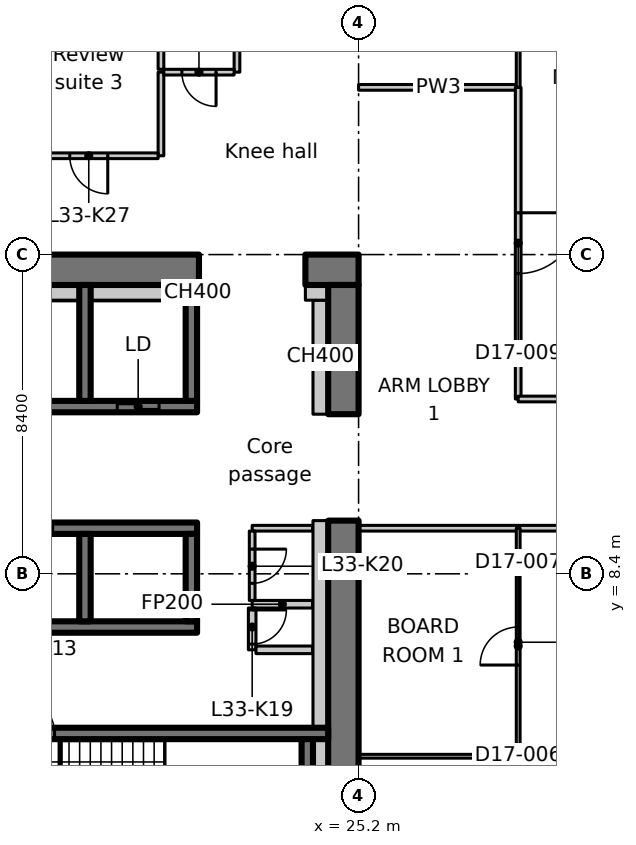
"""IFC4 building model, lengths in metres.
Left out: names, types, materials, properties, quantities, classifications, styles, units other than length and angle.
Written with IfcOpenShell. Run it as: python <this file> out.ifc"""

import sys

from ifc_helpers import new_model, si_unit, direction, frame, frame_2d, origin, place, context, subcontext, project, spatial, polyline, rectangle, outline, extrude, element, fill, save


model = new_model("IFC4")
c1 = context("Model", 3, precision=1e-05, world=origin(), true_north=direction((0.0, 1.0)))
c2 = subcontext(c1, "Body", "Model", "MODEL_VIEW")
j1 = project(units=[si_unit("LENGTHUNIT", "METRE"), si_unit("PLANEANGLEUNIT", "RADIAN")], contexts=[c1])
p1 = place(None, origin())
s1 = spatial("IfcSite", under=j1, at=p1, CompositionType="ELEMENT")
p2 = place(p1, origin())
s2 = spatial("IfcBuilding", under=s1, at=p2, CompositionType="ELEMENT")
p3 = place(p2, frame((0.0, 0.0, 134.9)))
s3 = spatial("IfcBuildingStorey", under=s2, at=p3, CompositionType="ELEMENT", Elevation=134.9)
p4 = place(p3, frame((-1.1, 16.4, 0.0), z_axis=(0.0, 0.0, 1.0), x_axis=(1.0, 0.0, 0.0)))
e1 = element("IfcWall", 1, at=p4, inside=s3, PredefinedType="SHEAR", context=c2, shape_type="SweptSolid", body=[
    extrude(rectangle(XDim=22.1, YDim=0.8, at=frame_2d((11.05, 0.0))), origin(), (0.0, 0.0, 1.0), 3.35),
])
p5 = place(p4, frame((3.15, 0.0, 0.0)))
e2 = element("IfcOpeningElement", 2, at=p5, cuts=e1, PredefinedType="OPENING", context=c2, shape_type="SweptSolid", body=[
    extrude(rectangle(XDim=1.1, YDim=2.3, at=frame_2d((0.55, 1.15))), frame((0.0, 0.41, 0.0), z_axis=(0.0, -1.0, 0.0), x_axis=(1.0, 0.0, 0.0)), (0.0, 0.0, 1.0), 0.82),
])
p6 = place(p3, frame((23.8, 16.4, 0.0), z_axis=(0.0, 0.0, 1.0), x_axis=(1.0, 0.0, 0.0)))
e3 = element("IfcWall", 3, at=p6, inside=s3, PredefinedType="SHEAR", context=c2, shape_type="SweptSolid", body=[
    extrude(rectangle(XDim=1.4, YDim=0.8, at=frame_2d((0.7, 0.0))), origin(), (0.0, 0.0, 1.0), 3.35),
])
p7 = place(p3, frame((24.8, 0.8, 0.0), z_axis=(0.0, 0.0, 1.0), x_axis=(0.0, 1.0, 0.0)))
e4 = element("IfcWall", 4, at=p7, inside=s3, PredefinedType="SHEAR", context=c2, shape_type="SweptSolid", body=[
    extrude(rectangle(XDim=9.0, YDim=0.8, at=frame_2d((4.5, 0.0))), origin(), (0.0, 0.0, 1.0), 3.35),
])
p8 = place(p3, frame((24.8, 12.6, 0.0), z_axis=(0.0, 0.0, 1.0), x_axis=(0.0, 1.0, 0.0)))
e5 = element("IfcWall", 5, at=p8, inside=s3, PredefinedType="SHEAR", context=c2, shape_type="SweptSolid", body=[
    extrude(rectangle(XDim=3.4, YDim=0.8, at=frame_2d((1.7, 0.0))), origin(), (0.0, 0.0, 1.0), 3.35),
])
p9 = place(p3, frame((24.2, 12.6, 0.0), z_axis=(0.0, 0.0, 1.0), x_axis=(0.0, 1.0, 0.0)))
e6 = element("IfcWall", 6, at=p9, inside=s3, PredefinedType="PARTITIONING", context=c2, shape_type="SweptSolid", body=[
    extrude(rectangle(XDim=3.0, YDim=0.4, at=frame_2d((1.5, 0.0))), origin(), (0.0, 0.0, 1.0), 3.35),
])
p10 = place(p3, frame((23.8, 15.8, 0.0), z_axis=(0.0, 0.0, 1.0), x_axis=(1.0, 0.0, 0.0)))
e7 = element("IfcWall", 7, at=p10, inside=s3, PredefinedType="PARTITIONING", context=c2, shape_type="SweptSolid", body=[
    extrude(rectangle(XDim=0.6, YDim=0.4, at=frame_2d((0.3, 0.0))), origin(), (0.0, 0.0, 1.0), 3.35),
])
p11 = place(p3, frame((0.8, 7.0, 0.0), z_axis=(0.0, 0.0, 1.0), x_axis=(1.0, 0.0, 0.0)))
e8 = element("IfcWall", 8, at=p11, inside=s3, PredefinedType="SHEAR", context=c2, shape_type="SweptSolid", body=[
    extrude(rectangle(XDim=20.15, YDim=0.3, at=frame_2d((10.075, 0.0))), origin(), (0.0, 0.0, 1.0), 3.35),
])
p12 = place(p3, frame((0.8, 9.6, 0.0), z_axis=(0.0, 0.0, 1.0), x_axis=(1.0, 0.0, 0.0)))
e9 = element("IfcWall", 9, at=p12, inside=s3, PredefinedType="SHEAR", context=c2, shape_type="SweptSolid", body=[
    extrude(rectangle(XDim=20.15, YDim=0.3, at=frame_2d((10.075, 0.0))), origin(), (0.0, 0.0, 1.0), 3.35),
])
p13 = place(p12, frame((1.25, 0.0, 0.0)))
e10 = element("IfcOpeningElement", 10, at=p13, cuts=e9, PredefinedType="OPENING", context=c2, shape_type="SweptSolid", body=[
    extrude(rectangle(XDim=1.1, YDim=2.3, at=frame_2d((0.55, 1.15))), frame((0.0, 0.16, 0.0), z_axis=(0.0, -1.0, 0.0), x_axis=(1.0, 0.0, 0.0)), (0.0, 0.0, 1.0), 0.32),
])
p14 = place(p12, frame((4.05, 0.0, 0.0)))
e11 = element("IfcOpeningElement", 11, at=p14, cuts=e9, PredefinedType="OPENING", context=c2, shape_type="SweptSolid", body=[
    extrude(rectangle(XDim=1.1, YDim=2.3, at=frame_2d((0.55, 1.15))), frame((0.0, 0.16, 0.0), z_axis=(0.0, -1.0, 0.0), x_axis=(1.0, 0.0, 0.0)), (0.0, 0.0, 1.0), 0.32),
])
p15 = place(p12, frame((6.85, 0.0, 0.0)))
e12 = element("IfcOpeningElement", 12, at=p15, cuts=e9, PredefinedType="OPENING", context=c2, shape_type="SweptSolid", body=[
    extrude(rectangle(XDim=1.1, YDim=2.3, at=frame_2d((0.55, 1.15))), frame((0.0, 0.16, 0.0), z_axis=(0.0, -1.0, 0.0), x_axis=(1.0, 0.0, 0.0)), (0.0, 0.0, 1.0), 0.32),
])
p16 = place(p12, frame((9.65, 0.0, 0.0)))
e13 = element("IfcOpeningElement", 13, at=p16, cuts=e9, PredefinedType="OPENING", context=c2, shape_type="SweptSolid", body=[
    extrude(rectangle(XDim=1.1, YDim=2.3, at=frame_2d((0.55, 1.15))), frame((0.0, 0.16, 0.0), z_axis=(0.0, -1.0, 0.0), x_axis=(1.0, 0.0, 0.0)), (0.0, 0.0, 1.0), 0.32),
])
p17 = place(p12, frame((12.45, 0.0, 0.0)))
e14 = element("IfcOpeningElement", 14, at=p17, cuts=e9, PredefinedType="OPENING", context=c2, shape_type="SweptSolid", body=[
    extrude(rectangle(XDim=1.1, YDim=2.3, at=frame_2d((0.55, 1.15))), frame((0.0, 0.16, 0.0), z_axis=(0.0, -1.0, 0.0), x_axis=(1.0, 0.0, 0.0)), (0.0, 0.0, 1.0), 0.32),
])
p18 = place(p12, frame((15.25, 0.0, 0.0)))
e15 = element("IfcOpeningElement", 15, at=p18, cuts=e9, PredefinedType="OPENING", context=c2, shape_type="SweptSolid", body=[
    extrude(rectangle(XDim=1.1, YDim=2.3, at=frame_2d((0.55, 1.15))), frame((0.0, 0.16, 0.0), z_axis=(0.0, -1.0, 0.0), x_axis=(1.0, 0.0, 0.0)), (0.0, 0.0, 1.0), 0.32),
])
for number, where, z_axis, x_axis in (
    (16, (18.0, 7.15, 0.0), (0.0, 0.0, 1.0), (0.0, 1.0, 0.0)),
    (17, (20.8, 7.15, 0.0), (0.0, 0.0, 1.0), (0.0, 1.0, 0.0)),
):
    element("IfcWall", number, at=place(p3, frame(where, z_axis=z_axis, x_axis=x_axis)), inside=s3, PredefinedType="SHEAR", context=c2, shape_type="SweptSolid", body=[
        extrude(rectangle(XDim=2.3, YDim=0.3, at=frame_2d((1.15, 0.0))), origin(), (0.0, 0.0, 1.0), 3.35),
    ])
p19 = place(p3, frame((15.05, 12.8, 0.0), z_axis=(0.0, 0.0, 1.0), x_axis=(1.0, 0.0, 0.0)))
e18 = element("IfcWall", 18, at=p19, inside=s3, PredefinedType="SHEAR", context=c2, shape_type="SweptSolid", body=[
    extrude(rectangle(XDim=5.9, YDim=0.3, at=frame_2d((2.95, 0.0))), origin(), (0.0, 0.0, 1.0), 3.35),
])
p20 = place(p19, frame((3.8, 0.0, 0.0)))
e19 = element("IfcOpeningElement", 19, at=p20, cuts=e18, PredefinedType="OPENING", context=c2, shape_type="SweptSolid", body=[
    extrude(rectangle(XDim=1.1, YDim=2.3, at=frame_2d((0.55, 1.15))), frame((0.0, 0.16, 0.0), z_axis=(0.0, -1.0, 0.0), x_axis=(1.0, 0.0, 0.0)), (0.0, 0.0, 1.0), 0.32),
])
for number, where, z_axis, x_axis in (
    (20, (18.0, 12.95, 0.0), (0.0, 0.0, 1.0), (0.0, 1.0, 0.0)),
    (21, (20.8, 12.95, 0.0), (0.0, 0.0, 1.0), (0.0, 1.0, 0.0)),
):
    element("IfcWall", number, at=place(p3, frame(where, z_axis=z_axis, x_axis=x_axis)), inside=s3, PredefinedType="SHEAR", context=c2, shape_type="SweptSolid", body=[
        extrude(rectangle(XDim=3.05, YDim=0.3, at=frame_2d((1.525, 0.0))), origin(), (0.0, 0.0, 1.0), 3.35),
    ])
p21 = place(p3, frame((15.8, 4.2, 0.0), z_axis=(0.0, 0.0, 1.0), x_axis=(1.0, 0.0, 0.0)))
e22 = element("IfcWall", 22, at=p21, inside=s3, PredefinedType="SHEAR", context=c2, shape_type="SweptSolid", body=[
    extrude(rectangle(XDim=8.6, YDim=0.3, at=frame_2d((4.3, 0.0))), origin(), (0.0, 0.0, 1.0), 3.35),
])
p22 = place(p21, frame((0.4, 0.0, 0.0)))
e23 = element("IfcOpeningElement", 23, at=p22, cuts=e22, PredefinedType="OPENING", context=c2, shape_type="SweptSolid", body=[
    extrude(rectangle(XDim=1.0, YDim=2.1, at=frame_2d((0.5, 1.05))), frame((0.0, 0.16, 0.0), z_axis=(0.0, -1.0, 0.0), x_axis=(1.0, 0.0, 0.0)), (0.0, 0.0, 1.0), 0.32),
])
p23 = place(p3, frame((23.85, 1.5, 0.0), z_axis=(0.0, 0.0, 1.0), x_axis=(0.0, 1.0, 0.0)))
e24 = element("IfcWall", 24, at=p23, inside=s3, PredefinedType="SHEAR", context=c2, shape_type="SweptSolid", body=[
    extrude(rectangle(XDim=2.55, YDim=0.3, at=frame_2d((1.275, 0.0))), origin(), (0.0, 0.0, 1.0), 3.35),
])
p24 = place(p3, frame((23.988, 7.6, 0.0), z_axis=(0.0, 0.0, 1.0), x_axis=(-1.0, 0.0, 0.0)))
e25 = element("IfcWall", 25, at=p24, inside=s3, PredefinedType="PARTITIONING", context=c2, shape_type="SweptSolid", body=[
    extrude(rectangle(XDim=1.588, YDim=0.2, at=frame_2d((0.794, 0.0))), origin(), (0.0, 0.0, 1.0), 3.35),
])
p25 = place(p3, frame((22.4, 7.5, 0.0), z_axis=(0.0, 0.0, 1.0), x_axis=(0.0, -1.0, 0.0)))
e26 = element("IfcWall", 26, at=p25, inside=s3, PredefinedType="PARTITIONING", context=c2, shape_type="SweptSolid", body=[
    extrude(rectangle(XDim=1.1, YDim=0.2, at=frame_2d((0.55, 0.0))), origin(), (0.0, 0.0, 1.0), 3.35),
])
p26 = place(p25, frame((0.05, 0.0, 0.0)))
e27 = element("IfcOpeningElement", 27, at=p26, cuts=e26, PredefinedType="OPENING", context=c2, shape_type="SweptSolid", body=[
    extrude(rectangle(XDim=0.9, YDim=2.1, at=frame_2d((0.45, 1.05))), frame((0.0, 0.11, 0.0), z_axis=(0.0, -1.0, 0.0), x_axis=(1.0, 0.0, 0.0)), (0.0, 0.0, 1.0), 0.22),
])
p27 = place(p3, frame((22.5, 6.4, 0.0), z_axis=(0.0, 0.0, 1.0), x_axis=(1.0, 0.0, 0.0)))
e28 = element("IfcWall", 28, at=p27, inside=s3, PredefinedType="PARTITIONING", context=c2, shape_type="SweptSolid", body=[
    extrude(rectangle(XDim=1.488, YDim=0.2, at=frame_2d((0.744, 0.0))), origin(), (0.0, 0.0, 1.0), 3.35),
])
p28 = place(p3, frame((20.0, 21.6, 0.0), z_axis=(0.0, 0.0, 1.0), x_axis=(0.0, -1.0, 0.0)))
e29 = element("IfcWall", 29, at=p28, inside=s3, PredefinedType="PARTITIONING", context=c2, shape_type="SweptSolid", body=[
    extrude(rectangle(XDim=2.2, YDim=0.15, at=frame_2d((1.1, 0.0))), origin(), (0.0, 0.0, 1.0), 3.35),
])
p29 = place(p3, frame((19.925, 19.4, 0.0), z_axis=(0.0, 0.0, 1.0), x_axis=(-1.0, 0.0, 0.0)))
e30 = element("IfcWall", 30, at=p29, inside=s3, PredefinedType="PARTITIONING", context=c2, shape_type="SweptSolid", body=[
    extrude(rectangle(XDim=3.725, YDim=0.15, at=frame_2d((1.863, 0.0))), origin(), (0.0, 0.0, 1.0), 3.35),
])
p30 = place(p29, frame((1.325, 0.0, 0.0)))
e31 = element("IfcOpeningElement", 31, at=p30, cuts=e30, PredefinedType="OPENING", context=c2, shape_type="SweptSolid", body=[
    extrude(rectangle(XDim=1.0, YDim=2.1, at=frame_2d((0.5, 1.05))), frame((0.0, 0.085, 0.0), z_axis=(0.0, -1.0, 0.0), x_axis=(1.0, 0.0, 0.0)), (0.0, 0.0, 1.0), 0.17),
])
p31 = place(p3, frame((22.0, 23.925, 0.0), z_axis=(0.0, 0.0, 1.0), x_axis=(0.0, -1.0, 0.0)))
e32 = element("IfcWall", 32, at=p31, inside=s3, PredefinedType="PARTITIONING", context=c2, shape_type="SweptSolid", body=[
    extrude(rectangle(XDim=2.325, YDim=0.15, at=frame_2d((1.163, 0.0))), origin(), (0.0, 0.0, 1.0), 3.35),
])
p32 = place(p3, frame((21.925, 21.6, 0.0), z_axis=(0.0, 0.0, 1.0), x_axis=(-1.0, 0.0, 0.0)))
e33 = element("IfcWall", 33, at=p32, inside=s3, PredefinedType="PARTITIONING", context=c2, shape_type="SweptSolid", body=[
    extrude(rectangle(XDim=1.85, YDim=0.15, at=frame_2d((0.925, 0.0))), origin(), (0.0, 0.0, 1.0), 3.35),
])
p33 = place(p32, frame((0.475, 0.0, 0.0)))
e34 = element("IfcOpeningElement", 34, at=p33, cuts=e33, PredefinedType="OPENING", context=c2, shape_type="SweptSolid", body=[
    extrude(rectangle(XDim=0.9, YDim=2.1, at=frame_2d((0.45, 1.05))), frame((0.0, 0.085, 0.0), z_axis=(0.0, -1.0, 0.0), x_axis=(1.0, 0.0, 0.0)), (0.0, 0.0, 1.0), 0.17),
])
p34 = place(p3, frame((20.0, 21.675, 0.0), z_axis=(0.0, 0.0, 1.0), x_axis=(0.0, 1.0, 0.0)))
e35 = element("IfcWall", 35, at=p34, inside=s3, PredefinedType="PARTITIONING", context=c2, shape_type="SweptSolid", body=[
    extrude(rectangle(XDim=2.15, YDim=0.15, at=frame_2d((1.075, 0.0))), origin(), (0.0, 0.0, 1.0), 3.35),
])
p35 = place(p3, frame((23.988, 9.6, 0.0), z_axis=(0.0, 0.0, 1.0), x_axis=(-1.0, 0.0, 0.0)))
e36 = element("IfcWall", 36, at=p35, inside=s3, PredefinedType="PARTITIONING", context=c2, shape_type="SweptSolid", body=[
    extrude(rectangle(XDim=1.588, YDim=0.15, at=frame_2d((0.794, 0.0))), origin(), (0.0, 0.0, 1.0), 3.35),
])
p36 = place(p3, frame((22.4, 9.525, 0.0), z_axis=(0.0, 0.0, 1.0), x_axis=(0.0, -1.0, 0.0)))
e37 = element("IfcWall", 37, at=p36, inside=s3, PredefinedType="PARTITIONING", context=c2, shape_type="SweptSolid", body=[
    extrude(rectangle(XDim=1.825, YDim=0.15, at=frame_2d((0.913, 0.0))), origin(), (0.0, 0.0, 1.0), 3.35),
])
p37 = place(p36, frame((0.475, 0.0, 0.0)))
e38 = element("IfcOpeningElement", 38, at=p37, cuts=e37, PredefinedType="OPENING", context=c2, shape_type="SweptSolid", body=[
    extrude(rectangle(XDim=0.9, YDim=2.1, at=frame_2d((0.45, 1.05))), frame((0.0, 0.085, 0.0), z_axis=(0.0, -1.0, 0.0), x_axis=(1.0, 0.0, 0.0)), (0.0, 0.0, 1.0), 0.17),
])
for number, where, z_axis, x_axis in (
    (39, (15.35, 15.8, 0.0), (0.0, 0.0, 1.0), (1.0, 0.0, 0.0)),
    (40, (18.15, 15.8, 0.0), (0.0, 0.0, 1.0), (1.0, 0.0, 0.0)),
):
    element("IfcWall", number, at=place(p3, frame(where, z_axis=z_axis, x_axis=x_axis)), inside=s3, PredefinedType="PARTITIONING", context=c2, shape_type="SweptSolid", body=[
        extrude(rectangle(XDim=2.5, YDim=0.4, at=frame_2d((1.25, 0.0))), origin(), (0.0, 0.0, 1.0), 3.35),
    ])
p38 = place(p3, frame((20.95, 15.8, 0.0), z_axis=(0.0, 0.0, 1.0), x_axis=(1.0, 0.0, 0.0)))
e41 = element("IfcWall", 41, at=p38, inside=s3, PredefinedType="PARTITIONING", context=c2, shape_type="SweptSolid", body=[
    extrude(rectangle(XDim=0.05, YDim=0.4, at=frame_2d((0.025, 0.0))), origin(), (0.0, 0.0, 1.0), 3.35),
])
p39 = place(p3, frame((24.2, 1.5, 0.0), z_axis=(0.0, 0.0, 1.0), x_axis=(0.0, 1.0, 0.0)))
e42 = element("IfcWall", 42, at=p39, inside=s3, PredefinedType="PARTITIONING", context=c2, shape_type="SweptSolid", body=[
    extrude(rectangle(XDim=2.55, YDim=0.4, at=frame_2d((1.275, 0.0))), origin(), (0.0, 0.0, 1.0), 3.35),
])
p40 = place(p3, frame((24.2, 4.35, 0.0), z_axis=(0.0, 0.0, 1.0), x_axis=(0.0, 1.0, 0.0)))
e43 = element("IfcWall", 43, at=p40, inside=s3, PredefinedType="PARTITIONING", context=c2, shape_type="SweptSolid", body=[
    extrude(rectangle(XDim=5.45, YDim=0.4, at=frame_2d((2.725, 0.0))), origin(), (0.0, 0.0, 1.0), 3.35),
])
for number, where, z_axis, x_axis in (
    (44, (25.2, 21.2, 0.0), (0.0, 0.0, 1.0), (1.0, 0.0, 0.0)),
    (45, (29.4, 9.6, 0.0), (0.0, 0.0, 1.0), (-1.0, 0.0, 0.0)),
):
    element("IfcWall", number, at=place(p3, frame(where, z_axis=z_axis, x_axis=x_axis)), inside=s3, PredefinedType="PARTITIONING", context=c2, shape_type="SweptSolid", body=[
        extrude(rectangle(XDim=4.2, YDim=0.15, at=frame_2d((2.1, 0.0))), origin(), (0.0, 0.0, 1.0), 3.33),
    ])
p41 = place(p3, frame((29.4, 21.2, 0.0), z_axis=(0.0, 0.0, 1.0), x_axis=(0.0, -1.0, 0.0)))
e46 = element("IfcWall", 46, at=p41, inside=s3, PredefinedType="PARTITIONING", context=c2, shape_type="SweptSolid", body=[
    extrude(rectangle(XDim=8.2, YDim=0.15, at=frame_2d((4.1, 0.0))), origin(), (0.0, 0.0, 1.0), 3.33),
])
p42 = place(p41, frame((3.3, 0.0, 0.0)))
e47 = element("IfcOpeningElement", 47, at=p42, cuts=e46, PredefinedType="OPENING", context=c2, shape_type="SweptSolid", body=[
    extrude(rectangle(XDim=1.6, YDim=2.1, at=frame_2d((0.8, 1.05))), frame((0.0, 0.085, 0.0), z_axis=(0.0, -1.0, 0.0), x_axis=(1.0, 0.0, 0.0)), (0.0, 0.0, 1.0), 0.17),
])
p43 = place(p3, frame((29.4, 27.511, 0.0), z_axis=(0.0, 0.0, 1.0), x_axis=(0.0, -1.0, 0.0)))
e48 = element("IfcWall", 48, at=p43, inside=s3, PredefinedType="PARTITIONING", context=c2, shape_type="SweptSolid", body=[
    extrude(outline(polyline([(0.0, 0.0), (6.311, 0.0), (6.311, 3.33), (2.761, 3.33), (2.759, 2.98), (1.863, 2.98), (1.861, 3.33), (0.236, 3.33), (0.0, 3.33), (0.0, 0.0)])), frame((0.0, 0.05, 0.0), z_axis=(0.0, -1.0, 0.0), x_axis=(1.0, 0.0, 0.0)), (0.0, 0.0, 1.0), 0.1),
])
p44 = place(p3, frame((37.8, 9.6, 0.0), z_axis=(0.0, 0.0, 1.0), x_axis=(-1.0, 0.0, 0.0)))
e49 = element("IfcWall", 49, at=p44, inside=s3, PredefinedType="PARTITIONING", context=c2, shape_type="SweptSolid", body=[
    extrude(rectangle(XDim=8.4, YDim=0.15, at=frame_2d((4.2, 0.0))), origin(), (0.0, 0.0, 1.0), 3.33),
])
p45 = place(p44, frame((1.8, 0.0, 0.0)))
e50 = element("IfcOpeningElement", 50, at=p45, cuts=e49, PredefinedType="OPENING", context=c2, shape_type="SweptSolid", body=[
    extrude(rectangle(XDim=1.6, YDim=2.1, at=frame_2d((0.8, 1.05))), frame((0.0, 0.085, 0.0), z_axis=(0.0, -1.0, 0.0), x_axis=(1.0, 0.0, 0.0)), (0.0, 0.0, 1.0), 0.17),
])
p46 = place(p3, frame((29.4, 13.0, 0.0), z_axis=(0.0, 0.0, 1.0), x_axis=(1.0, 0.0, 0.0)))
e51 = element("IfcWall", 51, at=p46, inside=s3, PredefinedType="PARTITIONING", context=c2, shape_type="SweptSolid", body=[
    extrude(rectangle(XDim=4.2, YDim=0.15, at=frame_2d((2.1, 0.0))), origin(), (0.0, 0.0, 1.0), 3.33),
])
p47 = place(p3, frame((29.4, -1.174, 0.0), z_axis=(0.0, 0.0, 1.0), x_axis=(0.0, 1.0, 0.0)))
e52 = element("IfcWall", 52, at=p47, inside=s3, PredefinedType="PARTITIONING", context=c2, shape_type="SweptSolid", body=[
    extrude(outline(polyline([(0.0, 0.0), (4.774, 0.0), (4.774, 3.33), (1.624, 3.33), (1.622, 2.98), (0.726, 2.98), (0.724, 3.33), (0.074, 3.33), (0.0, 3.33), (0.0, 0.0)])), frame((0.0, 0.05, 0.0), z_axis=(0.0, -1.0, 0.0), x_axis=(1.0, 0.0, 0.0)), (0.0, 0.0, 1.0), 0.1),
])
p48 = place(p47, frame((2.074, 0.0, 0.0)))
e53 = element("IfcOpeningElement", 53, at=p48, cuts=e52, PredefinedType="OPENING", context=c2, shape_type="SweptSolid", body=[
    extrude(rectangle(XDim=1.0, YDim=2.1, at=frame_2d((0.5, 1.05))), frame((0.0, 0.06, 0.0), z_axis=(0.0, -1.0, 0.0), x_axis=(1.0, 0.0, 0.0)), (0.0, 0.0, 1.0), 0.12),
])
p49 = place(p3, frame((29.4, 3.6, 0.0), z_axis=(0.0, 0.0, 1.0), x_axis=(0.0, 1.0, 0.0)))
e54 = element("IfcWall", 54, at=p49, inside=s3, PredefinedType="PARTITIONING", context=c2, shape_type="SweptSolid", body=[
    extrude(rectangle(XDim=6.0, YDim=0.1, at=frame_2d((3.0, 0.0))), origin(), (0.0, 0.0, 1.0), 3.33),
])
p50 = place(p49, frame((2.4, 0.0, 0.0)))
e55 = element("IfcOpeningElement", 55, at=p50, cuts=e54, PredefinedType="OPENING", context=c2, shape_type="SweptSolid", body=[
    extrude(rectangle(XDim=1.0, YDim=2.1, at=frame_2d((0.5, 1.05))), frame((0.0, 0.06, 0.0), z_axis=(0.0, -1.0, 0.0), x_axis=(1.0, 0.0, 0.0)), (0.0, 0.0, 1.0), 0.12),
])
p51 = place(p3, frame((25.2, 3.6, 0.0), z_axis=(0.0, 0.0, 1.0), x_axis=(1.0, 0.0, 0.0)))
e56 = element("IfcWall", 56, at=p51, inside=s3, PredefinedType="PARTITIONING", context=c2, shape_type="SweptSolid", body=[
    extrude(rectangle(XDim=4.2, YDim=0.1, at=frame_2d((2.1, 0.0))), origin(), (0.0, 0.0, 1.0), 3.33),
])
p52 = place(p18, origin())
e57 = element("IfcDoor", 57, at=p52, inside=s3, OperationType="SLIDING_TO_LEFT", PredefinedType="DOOR", context=c2, shape_type="SweptSolid", body=[
    extrude(rectangle(XDim=1.1, YDim=2.3, at=frame_2d((0.55, 1.15))), frame((0.0, 0.025, 0.0), z_axis=(0.0, -1.0, 0.0), x_axis=(1.0, 0.0, 0.0)), (0.0, 0.0, 1.0), 0.05),
])
fill(e15, e57)
p53 = place(p20, origin())
e58 = element("IfcDoor", 58, at=p53, inside=s3, OperationType="SLIDING_TO_LEFT", PredefinedType="DOOR", context=c2, shape_type="SweptSolid", body=[
    extrude(rectangle(XDim=1.1, YDim=2.3, at=frame_2d((0.55, 1.15))), frame((0.0, 0.025, 0.0), z_axis=(0.0, -1.0, 0.0), x_axis=(1.0, 0.0, 0.0)), (0.0, 0.0, 1.0), 0.05),
])
fill(e19, e58)
p54 = place(p22, origin())
e59 = element("IfcDoor", 59, at=p54, inside=s3, OperationType="SINGLE_SWING_LEFT", PredefinedType="DOOR", context=c2, shape_type="SweptSolid", body=[
    extrude(rectangle(XDim=1.0, YDim=2.1, at=frame_2d((0.5, 1.05))), frame((0.0, 0.025, 0.0), z_axis=(0.0, -1.0, 0.0), x_axis=(1.0, 0.0, 0.0)), (0.0, 0.0, 1.0), 0.05),
])
fill(e23, e59)
p55 = place(p26, origin())
e60 = element("IfcDoor", 60, at=p55, inside=s3, OperationType="SINGLE_SWING_LEFT", PredefinedType="DOOR", context=c2, shape_type="SweptSolid", body=[
    extrude(rectangle(XDim=0.9, YDim=2.1, at=frame_2d((0.45, 1.05))), frame((0.0, 0.025, 0.0), z_axis=(0.0, -1.0, 0.0), x_axis=(1.0, 0.0, 0.0)), (0.0, 0.0, 1.0), 0.05),
])
fill(e27, e60)
p56 = place(p37, origin())
e61 = element("IfcDoor", 61, at=p56, inside=s3, OperationType="SINGLE_SWING_RIGHT", PredefinedType="DOOR", context=c2, shape_type="SweptSolid", body=[
    extrude(rectangle(XDim=0.9, YDim=2.1, at=frame_2d((0.45, 1.05))), frame((0.0, 0.025, 0.0), z_axis=(0.0, -1.0, 0.0), x_axis=(1.0, 0.0, 0.0)), (0.0, 0.0, 1.0), 0.05),
])
fill(e38, e61)
p57 = place(p33, origin())
e62 = element("IfcDoor", 62, at=p57, inside=s3, OperationType="SINGLE_SWING_RIGHT", PredefinedType="DOOR", context=c2, shape_type="SweptSolid", body=[
    extrude(rectangle(XDim=0.9, YDim=2.1, at=frame_2d((0.45, 1.05))), frame((0.0, 0.025, 0.0), z_axis=(0.0, -1.0, 0.0), x_axis=(1.0, 0.0, 0.0)), (0.0, 0.0, 1.0), 0.05),
])
fill(e34, e62)
p58 = place(p30, origin())
e63 = element("IfcDoor", 63, at=p58, inside=s3, OperationType="SINGLE_SWING_LEFT", PredefinedType="DOOR", context=c2, shape_type="SweptSolid", body=[
    extrude(rectangle(XDim=1.0, YDim=2.1, at=frame_2d((0.5, 1.05))), frame((0.0, 0.025, 0.0), z_axis=(0.0, -1.0, 0.0), x_axis=(1.0, 0.0, 0.0)), (0.0, 0.0, 1.0), 0.05),
])
fill(e31, e63)
p59 = place(p50, origin())
e64 = element("IfcDoor", 64, at=p59, inside=s3, OperationType="SINGLE_SWING_LEFT", PredefinedType="DOOR", context=c2, shape_type="SweptSolid", body=[
    extrude(rectangle(XDim=1.0, YDim=2.1, at=frame_2d((0.5, 1.05))), frame((0.0, 0.025, 0.0), z_axis=(0.0, -1.0, 0.0), x_axis=(1.0, 0.0, 0.0)), (0.0, 0.0, 1.0), 0.05),
])
fill(e55, e64)
p60 = place(p42, origin())
e65 = element("IfcDoor", 65, at=p60, inside=s3, OperationType="DOUBLE_DOOR_SINGLE_SWING", PredefinedType="DOOR", context=c2, shape_type="SweptSolid", body=[
    extrude(rectangle(XDim=1.6, YDim=2.1, at=frame_2d((0.8, 1.05))), frame((0.0, 0.025, 0.0), z_axis=(0.0, -1.0, 0.0), x_axis=(1.0, 0.0, 0.0)), (0.0, 0.0, 1.0), 0.05),
])
fill(e47, e65)
save(model, sys.argv[1])
